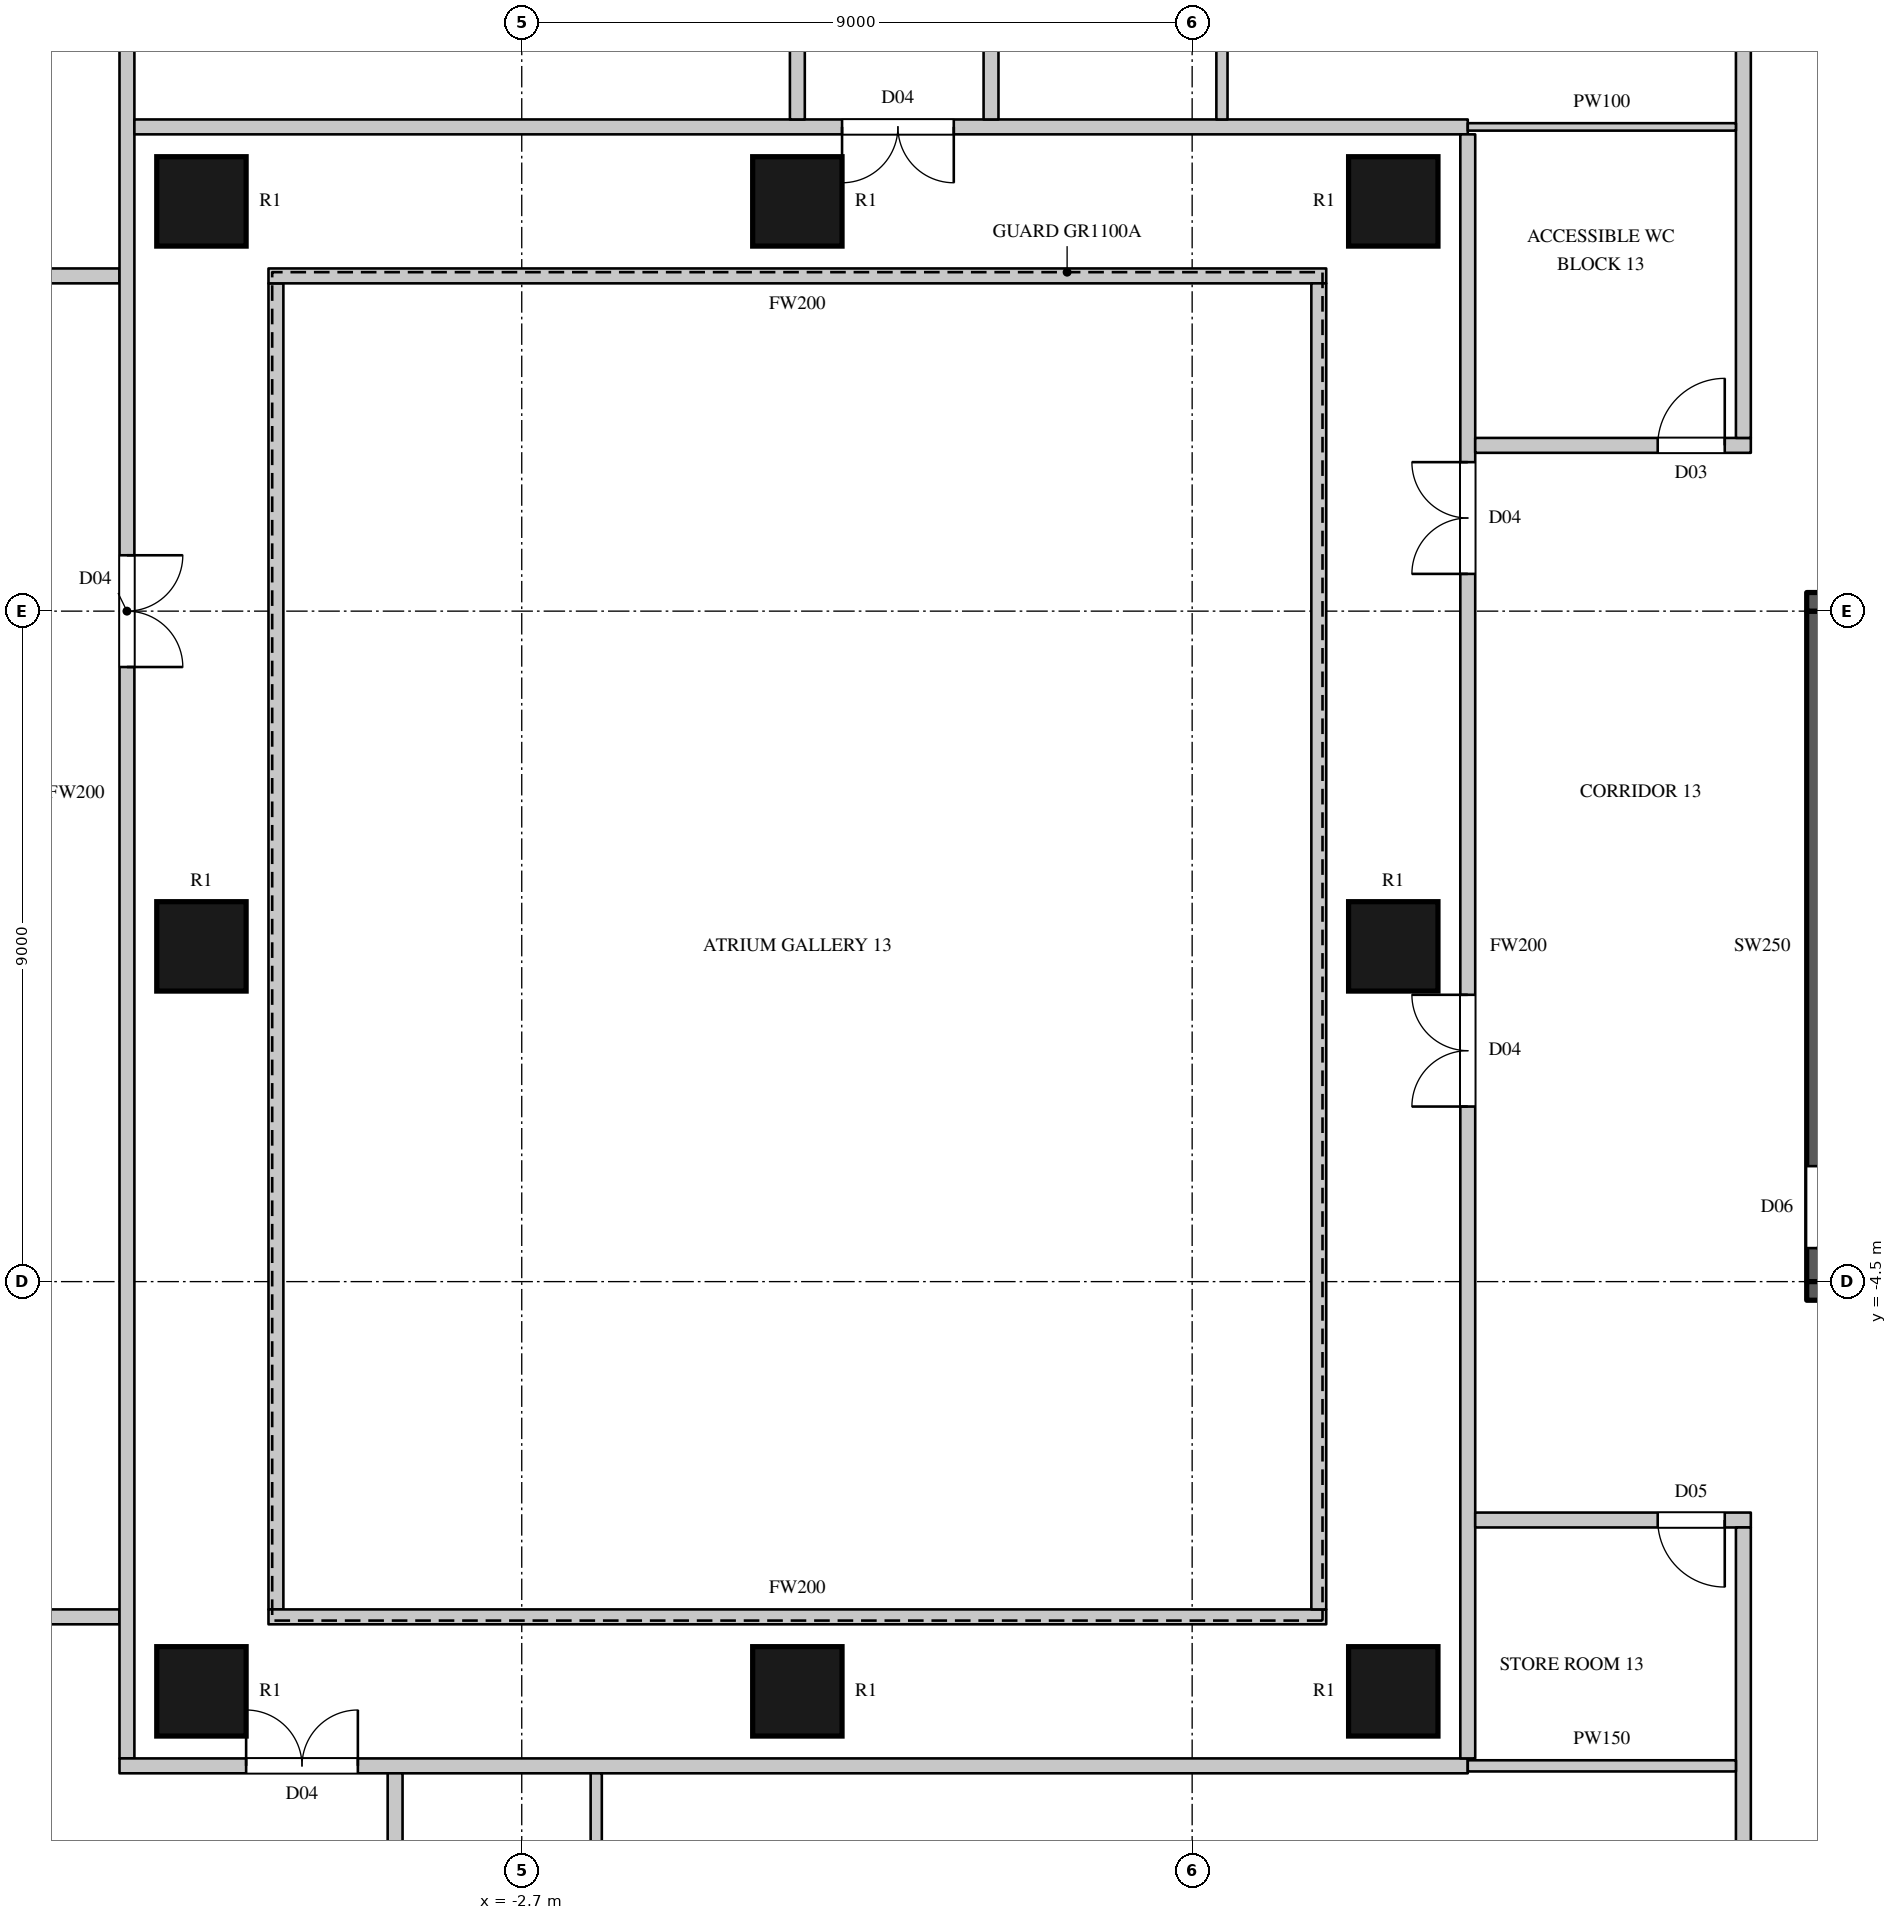
"""IFC4 building model, lengths in metres.
Left out: names, types, materials, properties, quantities, classifications, styles, units other than length and angle.
Written with IfcOpenShell. Run it as: python <this file> out.ifc"""

import sys

from ifc_helpers import new_model, si_unit, direction, frame, frame_2d, origin, origin_2d, place, context, subcontext, project, spatial, rectangle, circle, extrude, element, fill, save


model = new_model("IFC4")
c1 = context("Model", 3, precision=1e-05, world=origin(), true_north=direction((0.0, 1.0)))
c2 = subcontext(c1, "Body", "Model", "MODEL_VIEW")
j1 = project(units=[si_unit("LENGTHUNIT", "METRE"), si_unit("PLANEANGLEUNIT", "RADIAN")], contexts=[c1])
p1 = place(None, origin())
s1 = spatial("IfcSite", under=j1, at=p1, CompositionType="ELEMENT")
p2 = place(p1, origin())
s2 = spatial("IfcBuilding", under=s1, at=p2, CompositionType="ELEMENT")
p3 = place(p2, frame((0.0, 0.0, 77.1)))
s3 = spatial("IfcBuildingStorey", under=s2, at=p3, CompositionType="ELEMENT", Elevation=77.1)
for number, where, z_axis, x_axis in (
    (1, (-7.0, -10.0, 0.0), (0.0, 0.0, 1.0), (1.0, 0.0, 0.0)),
    (2, (-7.0, 0.0, 0.0), (0.0, 0.0, 1.0), (1.0, 0.0, 0.0)),
    (3, (-7.0, 10.0, 0.0), (0.0, 0.0, 1.0), (1.0, 0.0, 0.0)),
    (4, (1.0, -10.0, 0.0), (0.0, 0.0, 1.0), (1.0, 0.0, 0.0)),
    (5, (1.0, 10.0, 0.0), (0.0, 0.0, 1.0), (1.0, 0.0, 0.0)),
    (6, (9.0, -10.0, 0.0), (0.0, 0.0, 1.0), (1.0, 0.0, 0.0)),
    (7, (9.0, 0.0, 0.0), (0.0, 0.0, 1.0), (1.0, 0.0, 0.0)),
    (8, (9.0, 10.0, 0.0), (0.0, 0.0, 1.0), (1.0, 0.0, 0.0)),
):
    element("IfcColumn", number, at=place(p3, frame(where, z_axis=z_axis, x_axis=x_axis)), inside=s3, PredefinedType="COLUMN", context=c2, shape_type="SweptSolid", body=[
        extrude(circle(Radius=0.6, at=origin_2d()), origin(), (0.0, 0.0, 1.0), 3.6),
    ])
p4 = place(p3, frame((-13.97, -9.0, 0.0), z_axis=(0.0, 0.0, 1.0), x_axis=(1.0, 0.0, 0.0)))
e9 = element("IfcWall", 9, at=p4, inside=s3, PredefinedType="PARTITIONING", context=c2, shape_type="SweptSolid", body=[
    extrude(rectangle(XDim=5.87, YDim=0.2, at=frame_2d((2.935, 0.0))), origin(), (0.0, 0.0, 1.0), 3.3),
])
p5 = place(p4, frame((0.4, 0.0, 0.0)))
e10 = element("IfcOpeningElement", 10, at=p5, cuts=e9, PredefinedType="OPENING", context=c2, shape_type="SweptSolid", body=[
    extrude(rectangle(XDim=1.5, YDim=2.2, at=frame_2d((0.75, 1.1))), frame((0.0, 0.11, 0.0), z_axis=(0.0, -1.0, 0.0), x_axis=(1.0, 0.0, 0.0)), (0.0, 0.0, 1.0), 0.22),
])
p6 = place(p4, frame((2.05, 0.0, 0.0)))
e11 = element("IfcOpeningElement", 11, at=p6, cuts=e9, PredefinedType="OPENING", context=c2, shape_type="SweptSolid", body=[
    extrude(rectangle(XDim=1.5, YDim=2.2, at=frame_2d((0.75, 1.1))), frame((0.0, 0.11, 0.0), z_axis=(0.0, -1.0, 0.0), x_axis=(1.0, 0.0, 0.0)), (0.0, 0.0, 1.0), 0.22),
])
p7 = place(p3, frame((-13.97, 9.0, 0.0), z_axis=(0.0, 0.0, 1.0), x_axis=(1.0, 0.0, 0.0)))
e12 = element("IfcWall", 12, at=p7, inside=s3, PredefinedType="PARTITIONING", context=c2, shape_type="SweptSolid", body=[
    extrude(rectangle(XDim=5.87, YDim=0.2, at=frame_2d((2.935, 0.0))), origin(), (0.0, 0.0, 1.0), 3.3),
])
p8 = place(p3, frame((-8.0, -10.9, 0.0), z_axis=(0.0, 0.0, 1.0), x_axis=(0.0, 1.0, 0.0)))
e13 = element("IfcWall", 13, at=p8, inside=s3, PredefinedType="PARTITIONING", context=c2, shape_type="SweptSolid", body=[
    extrude(rectangle(XDim=25.9, YDim=0.2, at=frame_2d((12.95, 0.0))), origin(), (0.0, 0.0, 1.0), 3.3),
])
p9 = place(p8, frame((14.65, 0.0, 0.0)))
e14 = element("IfcOpeningElement", 14, at=p9, cuts=e13, PredefinedType="OPENING", context=c2, shape_type="SweptSolid", body=[
    extrude(rectangle(XDim=1.5, YDim=2.2, at=frame_2d((0.75, 1.1))), frame((0.0, 0.11, 0.0), z_axis=(0.0, -1.0, 0.0), x_axis=(1.0, 0.0, 0.0)), (0.0, 0.0, 1.0), 0.22),
])
p10 = place(p8, frame((24.15, 0.0, 0.0)))
e15 = element("IfcOpeningElement", 15, at=p10, cuts=e13, PredefinedType="OPENING", context=c2, shape_type="SweptSolid", body=[
    extrude(rectangle(XDim=1.6, YDim=2.4, at=frame_2d((0.8, 1.2))), frame((0.0, 0.11, 0.0), z_axis=(0.0, -1.0, 0.0), x_axis=(1.0, 0.0, 0.0)), (0.0, 0.0, 1.0), 0.22),
])
p11 = place(p3, frame((-8.1, -11.0, 0.0), z_axis=(0.0, 0.0, 1.0), x_axis=(1.0, 0.0, 0.0)))
e16 = element("IfcWall", 16, at=p11, inside=s3, PredefinedType="PARTITIONING", context=c2, shape_type="SweptSolid", body=[
    extrude(rectangle(XDim=18.1, YDim=0.2, at=frame_2d((9.05, 0.0))), origin(), (0.0, 0.0, 1.0), 3.3),
])
p12 = place(p11, frame((1.7, 0.0, 0.0)))
e17 = element("IfcOpeningElement", 17, at=p12, cuts=e16, PredefinedType="OPENING", context=c2, shape_type="SweptSolid", body=[
    extrude(rectangle(XDim=1.5, YDim=2.2, at=frame_2d((0.75, 1.1))), frame((0.0, 0.11, 0.0), z_axis=(0.0, -1.0, 0.0), x_axis=(1.0, 0.0, 0.0)), (0.0, 0.0, 1.0), 0.22),
])
p13 = place(p3, frame((-7.9, 11.0, 0.0), z_axis=(0.0, 0.0, 1.0), x_axis=(1.0, 0.0, 0.0)))
e18 = element("IfcWall", 18, at=p13, inside=s3, PredefinedType="PARTITIONING", context=c2, shape_type="SweptSolid", body=[
    extrude(rectangle(XDim=17.9, YDim=0.2, at=frame_2d((8.95, 0.0))), origin(), (0.0, 0.0, 1.0), 3.3),
])
p14 = place(p13, frame((9.5, 0.0, 0.0)))
e19 = element("IfcOpeningElement", 19, at=p14, cuts=e18, PredefinedType="OPENING", context=c2, shape_type="SweptSolid", body=[
    extrude(rectangle(XDim=1.5, YDim=2.2, at=frame_2d((0.75, 1.1))), frame((0.0, 0.11, 0.0), z_axis=(0.0, -1.0, 0.0), x_axis=(1.0, 0.0, 0.0)), (0.0, 0.0, 1.0), 0.22),
])
p15 = place(p3, frame((-6.0, -8.9, 0.0), z_axis=(0.0, 0.0, 1.0), x_axis=(0.0, 1.0, 0.0)))
e20 = element("IfcWall", 20, at=p15, inside=s3, PredefinedType="PARTITIONING", context=c2, shape_type="SweptSolid", body=[
    extrude(rectangle(XDim=17.8, YDim=0.2, at=frame_2d((8.9, 0.0))), origin(), (0.0, 0.0, 1.0), 3.3),
])
for number, where, z_axis, x_axis in (
    (21, (-6.1, -9.0, 0.0), (0.0, 0.0, 1.0), (1.0, 0.0, 0.0)),
    (22, (-6.1, 9.0, 0.0), (0.0, 0.0, 1.0), (1.0, 0.0, 0.0)),
):
    element("IfcWall", number, at=place(p3, frame(where, z_axis=z_axis, x_axis=x_axis)), inside=s3, PredefinedType="PARTITIONING", context=c2, shape_type="SweptSolid", body=[
        extrude(rectangle(XDim=14.2, YDim=0.2, at=frame_2d((7.1, 0.0))), origin(), (0.0, 0.0, 1.0), 3.3),
    ])
p16 = place(p3, frame((-4.4, -15.0, 0.0), z_axis=(0.0, 0.0, 1.0), x_axis=(0.0, 1.0, 0.0)))
e23 = element("IfcWall", 23, at=p16, inside=s3, PredefinedType="PARTITIONING", context=c2, shape_type="SweptSolid", body=[
    extrude(rectangle(XDim=3.9, YDim=0.2, at=frame_2d((1.95, 0.0))), origin(), (0.0, 0.0, 1.0), 3.3),
])
p17 = place(p16, frame((0.15, 0.0, 0.0)))
e24 = element("IfcOpeningElement", 24, at=p17, cuts=e23, PredefinedType="OPENING", context=c2, shape_type="SweptSolid", body=[
    extrude(rectangle(XDim=0.9, YDim=2.2, at=frame_2d((0.45, 1.1))), frame((0.0, 0.11, 0.0), z_axis=(0.0, -1.0, 0.0), x_axis=(1.0, 0.0, 0.0)), (0.0, 0.0, 1.0), 0.22),
])
p18 = place(p3, frame((1.0, 11.1, 0.0), z_axis=(0.0, 0.0, 1.0), x_axis=(0.0, 1.0, 0.0)))
e25 = element("IfcWall", 25, at=p18, inside=s3, PredefinedType="PARTITIONING", context=c2, shape_type="SweptSolid", body=[
    extrude(rectangle(XDim=3.9, YDim=0.2, at=frame_2d((1.95, 0.0))), origin(), (0.0, 0.0, 1.0), 3.3),
])
p19 = place(p3, frame((3.6, 11.1, 0.0), z_axis=(0.0, 0.0, 1.0), x_axis=(0.0, 1.0, 0.0)))
e26 = element("IfcWall", 26, at=p19, inside=s3, PredefinedType="PARTITIONING", context=c2, shape_type="SweptSolid", body=[
    extrude(rectangle(XDim=3.9, YDim=0.2, at=frame_2d((1.95, 0.0))), origin(), (0.0, 0.0, 1.0), 3.3),
])
p20 = place(p19, frame((2.8, 0.0, 0.0)))
e27 = element("IfcOpeningElement", 27, at=p20, cuts=e26, PredefinedType="OPENING", context=c2, shape_type="SweptSolid", body=[
    extrude(rectangle(XDim=0.95, YDim=2.2, at=frame_2d((0.475, 1.1))), frame((0.0, 0.11, 0.0), z_axis=(0.0, -1.0, 0.0), x_axis=(1.0, 0.0, 0.0)), (0.0, 0.0, 1.0), 0.22),
])
p21 = place(p3, frame((8.0, -8.9, 0.0), z_axis=(0.0, 0.0, 1.0), x_axis=(0.0, 1.0, 0.0)))
e28 = element("IfcWall", 28, at=p21, inside=s3, PredefinedType="PARTITIONING", context=c2, shape_type="SweptSolid", body=[
    extrude(rectangle(XDim=17.8, YDim=0.2, at=frame_2d((8.9, 0.0))), origin(), (0.0, 0.0, 1.0), 3.3),
])
p22 = place(p3, frame((10.0, -10.9, 0.0), z_axis=(0.0, 0.0, 1.0), x_axis=(0.0, 1.0, 0.0)))
e29 = element("IfcWall", 29, at=p22, inside=s3, PredefinedType="PARTITIONING", context=c2, shape_type="SweptSolid", body=[
    extrude(rectangle(XDim=21.8, YDim=0.2, at=frame_2d((10.9, 0.0))), origin(), (0.0, 0.0, 1.0), 3.3),
])
p23 = place(p22, frame((15.9, 0.0, 0.0)))
e30 = element("IfcOpeningElement", 30, at=p23, cuts=e29, PredefinedType="OPENING", context=c2, shape_type="SweptSolid", body=[
    extrude(rectangle(XDim=1.5, YDim=2.2, at=frame_2d((0.75, 1.1))), frame((0.0, 0.11, 0.0), z_axis=(0.0, -1.0, 0.0), x_axis=(1.0, 0.0, 0.0)), (0.0, 0.0, 1.0), 0.22),
])
p24 = place(p22, frame((8.75, 0.0, 0.0)))
e31 = element("IfcOpeningElement", 31, at=p24, cuts=e29, PredefinedType="OPENING", context=c2, shape_type="SweptSolid", body=[
    extrude(rectangle(XDim=1.5, YDim=2.2, at=frame_2d((0.75, 1.1))), frame((0.0, 0.11, 0.0), z_axis=(0.0, -1.0, 0.0), x_axis=(1.0, 0.0, 0.0)), (0.0, 0.0, 1.0), 0.22),
])
p25 = place(p3, frame((10.1, -7.7, 0.0), z_axis=(0.0, 0.0, 1.0), x_axis=(1.0, 0.0, 0.0)))
e32 = element("IfcWall", 32, at=p25, inside=s3, PredefinedType="PARTITIONING", context=c2, shape_type="SweptSolid", body=[
    extrude(rectangle(XDim=3.7, YDim=0.2, at=frame_2d((1.85, 0.0))), origin(), (0.0, 0.0, 1.0), 3.3),
])
p26 = place(p25, frame((2.45, 0.0, 0.0)))
e33 = element("IfcOpeningElement", 33, at=p26, cuts=e32, PredefinedType="OPENING", context=c2, shape_type="SweptSolid", body=[
    extrude(rectangle(XDim=0.9, YDim=2.2, at=frame_2d((0.45, 1.1))), frame((0.0, 0.11, 0.0), z_axis=(0.0, -1.0, 0.0), x_axis=(1.0, 0.0, 0.0)), (0.0, 0.0, 1.0), 0.22),
])
p27 = place(p3, frame((10.1, 6.725, 0.0), z_axis=(0.0, 0.0, 1.0), x_axis=(1.0, 0.0, 0.0)))
e34 = element("IfcWall", 34, at=p27, inside=s3, PredefinedType="PARTITIONING", context=c2, shape_type="SweptSolid", body=[
    extrude(rectangle(XDim=3.7, YDim=0.2, at=frame_2d((1.85, 0.0))), origin(), (0.0, 0.0, 1.0), 3.3),
])
p28 = place(p27, frame((2.45, 0.0, 0.0)))
e35 = element("IfcOpeningElement", 35, at=p28, cuts=e34, PredefinedType="OPENING", context=c2, shape_type="SweptSolid", body=[
    extrude(rectangle(XDim=0.9, YDim=2.2, at=frame_2d((0.45, 1.1))), frame((0.0, 0.11, 0.0), z_axis=(0.0, -1.0, 0.0), x_axis=(1.0, 0.0, 0.0)), (0.0, 0.0, 1.0), 0.22),
])
p29 = place(p3, frame((13.7, -15.0, 0.0), z_axis=(0.0, 0.0, 1.0), x_axis=(0.0, 1.0, 0.0)))
e36 = element("IfcWall", 36, at=p29, inside=s3, PredefinedType="PARTITIONING", context=c2, shape_type="SweptSolid", body=[
    extrude(rectangle(XDim=7.2, YDim=0.2, at=frame_2d((3.6, 0.0))), origin(), (0.0, 0.0, 1.0), 3.3),
])
p30 = place(p3, frame((13.7, 6.825, 0.0), z_axis=(0.0, 0.0, 1.0), x_axis=(0.0, 1.0, 0.0)))
e37 = element("IfcWall", 37, at=p30, inside=s3, PredefinedType="PARTITIONING", context=c2, shape_type="SweptSolid", body=[
    extrude(rectangle(XDim=8.175, YDim=0.2, at=frame_2d((4.087, 0.0))), origin(), (0.0, 0.0, 1.0), 3.3),
])
for number, where, z_axis, x_axis in (
    (38, (-1.7, -15.0, 0.0), (0.0, 0.0, 1.0), (0.0, 1.0, 0.0)),
    (39, (6.7, 11.1, 0.0), (0.0, 0.0, 1.0), (0.0, 1.0, 0.0)),
):
    element("IfcWall", number, at=place(p3, frame(where, z_axis=z_axis, x_axis=x_axis)), inside=s3, PredefinedType="PARTITIONING", context=c2, shape_type="SweptSolid", body=[
        extrude(rectangle(XDim=3.9, YDim=0.15, at=frame_2d((1.95, 0.0))), origin(), (0.0, 0.0, 1.0), 3.3),
    ])
p31 = place(p3, frame((10.0, -11.0, 0.0), z_axis=(0.0, 0.0, 1.0), x_axis=(1.0, 0.0, 0.0)))
e40 = element("IfcWall", 40, at=p31, inside=s3, PredefinedType="PARTITIONING", context=c2, shape_type="SweptSolid", body=[
    extrude(rectangle(XDim=3.6, YDim=0.15, at=frame_2d((1.8, 0.0))), origin(), (0.0, 0.0, 1.0), 3.3),
])
p32 = place(p3, frame((14.675, -4.5, 0.0), z_axis=(0.0, 0.0, 1.0), x_axis=(0.0, 1.0, 0.0)))
e41 = element("IfcWall", 41, at=p32, inside=s3, PredefinedType="SHEAR", context=c2, shape_type="SweptSolid", body=[
    extrude(rectangle(XDim=9.0, YDim=0.25, at=frame_2d((4.5, 0.0))), origin(), (0.0, 0.0, 1.0), 3.3),
])
p33 = place(p32, frame((0.45, 0.0, 0.0)))
e42 = element("IfcOpeningElement", 42, at=p33, cuts=e41, PredefinedType="OPENING", context=c2, shape_type="SweptSolid", body=[
    extrude(rectangle(XDim=1.1, YDim=2.2, at=frame_2d((0.55, 1.1))), frame((0.0, 0.135, 0.0), z_axis=(0.0, -1.0, 0.0), x_axis=(1.0, 0.0, 0.0)), (0.0, 0.0, 1.0), 0.27),
])
for number, where, z_axis, x_axis in (
    (43, (14.55, -4.625, 0.0), (0.0, 0.0, 1.0), (1.0, 0.0, 0.0)),
    (44, (14.55, 4.625, 0.0), (0.0, 0.0, 1.0), (1.0, 0.0, 0.0)),
):
    element("IfcWall", number, at=place(p3, frame(where, z_axis=z_axis, x_axis=x_axis)), inside=s3, PredefinedType="SHEAR", context=c2, shape_type="SweptSolid", body=[
        extrude(rectangle(XDim=4.7, YDim=0.25, at=frame_2d((2.35, 0.0))), origin(), (0.0, 0.0, 1.0), 3.3),
    ])
p34 = place(p3, frame((10.0, 11.0, 0.0), z_axis=(0.0, 0.0, 1.0), x_axis=(1.0, 0.0, 0.0)))
e45 = element("IfcWall", 45, at=p34, inside=s3, PredefinedType="PARTITIONING", context=c2, shape_type="SweptSolid", body=[
    extrude(rectangle(XDim=3.6, YDim=0.1, at=frame_2d((1.8, 0.0))), origin(), (0.0, 0.0, 1.0), 3.3),
])
p35 = place(p9, origin())
e46 = element("IfcDoor", 46, at=p35, inside=s3, OperationType="DOUBLE_DOOR_SINGLE_SWING", PredefinedType="DOOR", context=c2, shape_type="SweptSolid", body=[
    extrude(rectangle(XDim=1.5, YDim=2.2, at=frame_2d((0.75, 1.1))), frame((0.0, 0.025, 0.0), z_axis=(0.0, -1.0, 0.0), x_axis=(1.0, 0.0, 0.0)), (0.0, 0.0, 1.0), 0.05),
])
fill(e14, e46)
p36 = place(p12, origin())
e47 = element("IfcDoor", 47, at=p36, inside=s3, OperationType="DOUBLE_DOOR_SINGLE_SWING", PredefinedType="DOOR", context=c2, shape_type="SweptSolid", body=[
    extrude(rectangle(XDim=1.5, YDim=2.2, at=frame_2d((0.75, 1.1))), frame((0.0, 0.025, 0.0), z_axis=(0.0, -1.0, 0.0), x_axis=(1.0, 0.0, 0.0)), (0.0, 0.0, 1.0), 0.05),
])
fill(e17, e47)
p37 = place(p14, origin())
e48 = element("IfcDoor", 48, at=p37, inside=s3, OperationType="DOUBLE_DOOR_SINGLE_SWING", PredefinedType="DOOR", context=c2, shape_type="SweptSolid", body=[
    extrude(rectangle(XDim=1.5, YDim=2.2, at=frame_2d((0.75, 1.1))), frame((0.0, 0.025, 0.0), z_axis=(0.0, -1.0, 0.0), x_axis=(1.0, 0.0, 0.0)), (0.0, 0.0, 1.0), 0.05),
])
fill(e19, e48)
p38 = place(p23, origin())
e49 = element("IfcDoor", 49, at=p38, inside=s3, OperationType="DOUBLE_DOOR_SINGLE_SWING", PredefinedType="DOOR", context=c2, shape_type="SweptSolid", body=[
    extrude(rectangle(XDim=1.5, YDim=2.2, at=frame_2d((0.75, 1.1))), frame((0.0, 0.025, 0.0), z_axis=(0.0, -1.0, 0.0), x_axis=(1.0, 0.0, 0.0)), (0.0, 0.0, 1.0), 0.05),
])
fill(e30, e49)
p39 = place(p24, origin())
e50 = element("IfcDoor", 50, at=p39, inside=s3, OperationType="DOUBLE_DOOR_SINGLE_SWING", PredefinedType="DOOR", context=c2, shape_type="SweptSolid", body=[
    extrude(rectangle(XDim=1.5, YDim=2.2, at=frame_2d((0.75, 1.1))), frame((0.0, 0.025, 0.0), z_axis=(0.0, -1.0, 0.0), x_axis=(1.0, 0.0, 0.0)), (0.0, 0.0, 1.0), 0.05),
])
fill(e31, e50)
p40 = place(p26, origin())
e51 = element("IfcDoor", 51, at=p40, inside=s3, OperationType="SINGLE_SWING_LEFT", PredefinedType="DOOR", context=c2, shape_type="SweptSolid", body=[
    extrude(rectangle(XDim=0.9, YDim=2.2, at=frame_2d((0.45, 1.1))), frame((0.0, 0.025, 0.0), z_axis=(0.0, -1.0, 0.0), x_axis=(1.0, 0.0, 0.0)), (0.0, 0.0, 1.0), 0.05),
])
fill(e33, e51)
p41 = place(p28, origin())
e52 = element("IfcDoor", 52, at=p41, inside=s3, OperationType="SINGLE_SWING_RIGHT", PredefinedType="DOOR", context=c2, shape_type="SweptSolid", body=[
    extrude(rectangle(XDim=0.9, YDim=2.2, at=frame_2d((0.45, 1.1))), frame((0.0, 0.025, 0.0), z_axis=(0.0, -1.0, 0.0), x_axis=(1.0, 0.0, 0.0)), (0.0, 0.0, 1.0), 0.05),
])
fill(e35, e52)
p42 = place(p33, origin())
e53 = element("IfcDoor", 53, at=p42, inside=s3, OperationType="SINGLE_SWING_RIGHT", PredefinedType="DOOR", context=c2, shape_type="SweptSolid", body=[
    extrude(rectangle(XDim=1.1, YDim=2.2, at=frame_2d((0.55, 1.1))), frame((0.0, 0.025, 0.0), z_axis=(0.0, -1.0, 0.0), x_axis=(1.0, 0.0, 0.0)), (0.0, 0.0, 1.0), 0.05),
])
fill(e42, e53)
save(model, sys.argv[1])
